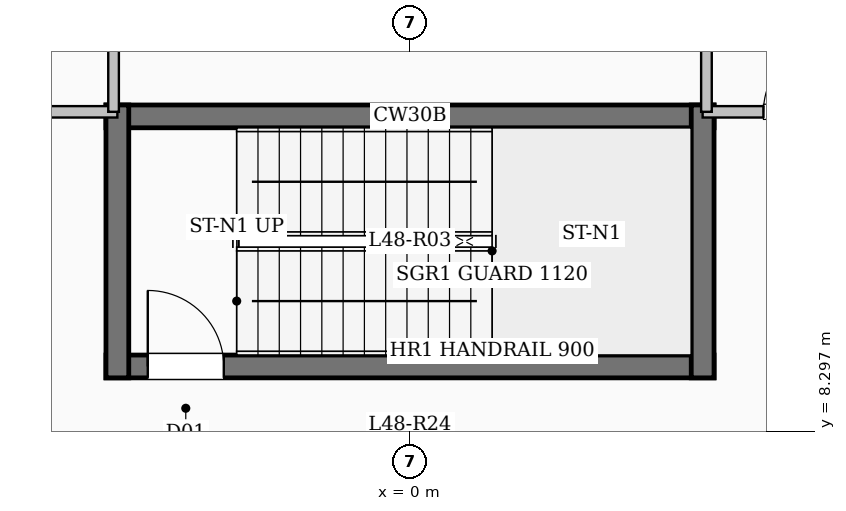
"""IFC4 building model, lengths in metres.
Left out: names, types, materials, properties, quantities, classifications, styles, units other than length and angle.
Written with IfcOpenShell. Run it as: python <this file> out.ifc"""

import sys

from ifc_helpers import new_model, si_unit, direction, frame, frame_2d, origin, place, context, subcontext, project, spatial, rectangle, extrude, element, fill, save


model = new_model("IFC4")
c1 = context("Model", 3, precision=1e-05, world=origin(), true_north=direction((0.0, 1.0)))
c2 = subcontext(c1, "Body", "Model", "MODEL_VIEW")
j1 = project(units=[si_unit("LENGTHUNIT", "METRE"), si_unit("PLANEANGLEUNIT", "RADIAN")], contexts=[c1])
p1 = place(None, origin())
s1 = spatial("IfcSite", under=j1, at=p1, CompositionType="ELEMENT")
p2 = place(p1, origin())
s2 = spatial("IfcBuilding", under=s1, at=p2, CompositionType="ELEMENT")
p3 = place(p2, frame((0.0, 0.0, 177.3)))
s3 = spatial("IfcBuildingStorey", under=s2, at=p3, CompositionType="ELEMENT", Elevation=177.3)
p4 = place(p3, frame((-4.0, 12.44, 0.0), z_axis=(0.0, 0.0, 1.0), x_axis=(1.0, 0.0, 0.0)))
e1 = element("IfcWall", 1, at=p4, inside=s3, PredefinedType="SHEAR", context=c2, shape_type="SweptSolid", body=[
    extrude(rectangle(XDim=8.0, YDim=0.3, at=frame_2d((4.0, 0.0))), origin(), (0.0, 0.0, 1.0), 4.5),
])
p5 = place(p3, frame((-4.0, 9.15, 0.0), z_axis=(0.0, 0.0, 1.0), x_axis=(1.0, 0.0, 0.0)))
e2 = element("IfcWall", 2, at=p5, inside=s3, PredefinedType="SHEAR", context=c2, shape_type="SweptSolid", body=[
    extrude(rectangle(XDim=8.0, YDim=0.3, at=frame_2d((4.0, 0.0))), origin(), (0.0, 0.0, 1.0), 4.5),
])
p6 = place(p5, frame((0.55, 0.0, 0.0)))
e3 = element("IfcOpeningElement", 3, at=p6, cuts=e2, PredefinedType="OPENING", context=c2, shape_type="SweptSolid", body=[
    extrude(rectangle(XDim=1.0, YDim=2.15, at=frame_2d((0.5, 1.075))), frame((0.0, 0.16, 0.0), z_axis=(0.0, -1.0, 0.0), x_axis=(1.0, 0.0, 0.0)), (0.0, 0.0, 1.0), 0.32),
])
for number, where, z_axis, x_axis in (
    (4, (-3.85, 9.0, 0.0), (0.0, 0.0, 1.0), (0.0, 1.0, 0.0)),
    (5, (3.85, 9.0, 0.0), (0.0, 0.0, 1.0), (0.0, 1.0, 0.0)),
):
    element("IfcWall", number, at=place(p3, frame(where, z_axis=z_axis, x_axis=x_axis)), inside=s3, PredefinedType="SHEAR", context=c2, shape_type="SweptSolid", body=[
        extrude(rectangle(XDim=3.59, YDim=0.3, at=frame_2d((1.795, 0.0))), origin(), (0.0, 0.0, 1.0), 4.5),
    ])
p7 = place(p3, frame((-19.55, 12.5, 0.0), z_axis=(0.0, 0.0, 1.0), x_axis=(1.0, 0.0, 0.0)))
e6 = element("IfcWall", 6, at=p7, inside=s3, PredefinedType="PARTITIONING", context=c2, shape_type="SweptSolid", body=[
    extrude(rectangle(XDim=15.7, YDim=0.15, at=frame_2d((7.85, 0.0))), origin(), (0.0, 0.0, 1.0), 4.2),
])
p8 = place(p7, frame((0.65, 0.0, 0.0)))
e7 = element("IfcOpeningElement", 7, at=p8, cuts=e6, PredefinedType="OPENING", context=c2, shape_type="SweptSolid", body=[
    extrude(rectangle(XDim=0.95, YDim=2.15, at=frame_2d((0.475, 1.075))), frame((0.0, 0.085, 0.0), z_axis=(0.0, -1.0, 0.0), x_axis=(1.0, 0.0, 0.0)), (0.0, 0.0, 1.0), 0.17),
])
p9 = place(p7, frame((4.55, 0.0, 0.0)))
e8 = element("IfcOpeningElement", 8, at=p9, cuts=e6, PredefinedType="OPENING", context=c2, shape_type="SweptSolid", body=[
    extrude(rectangle(XDim=0.95, YDim=2.15, at=frame_2d((0.475, 1.075))), frame((0.0, 0.085, 0.0), z_axis=(0.0, -1.0, 0.0), x_axis=(1.0, 0.0, 0.0)), (0.0, 0.0, 1.0), 0.17),
])
p10 = place(p7, frame((8.45, 0.0, 0.0)))
e9 = element("IfcOpeningElement", 9, at=p10, cuts=e6, PredefinedType="OPENING", context=c2, shape_type="SweptSolid", body=[
    extrude(rectangle(XDim=0.95, YDim=2.15, at=frame_2d((0.475, 1.075))), frame((0.0, 0.085, 0.0), z_axis=(0.0, -1.0, 0.0), x_axis=(1.0, 0.0, 0.0)), (0.0, 0.0, 1.0), 0.17),
])
p11 = place(p7, frame((12.35, 0.0, 0.0)))
e10 = element("IfcOpeningElement", 10, at=p11, cuts=e6, PredefinedType="OPENING", context=c2, shape_type="SweptSolid", body=[
    extrude(rectangle(XDim=0.95, YDim=2.15, at=frame_2d((0.475, 1.075))), frame((0.0, 0.085, 0.0), z_axis=(0.0, -1.0, 0.0), x_axis=(1.0, 0.0, 0.0)), (0.0, 0.0, 1.0), 0.17),
])
p12 = place(p3, frame((3.85, 12.5, 0.0), z_axis=(0.0, 0.0, 1.0), x_axis=(1.0, 0.0, 0.0)))
e11 = element("IfcWall", 11, at=p12, inside=s3, PredefinedType="PARTITIONING", context=c2, shape_type="SweptSolid", body=[
    extrude(rectangle(XDim=15.7, YDim=0.15, at=frame_2d((7.85, 0.0))), origin(), (0.0, 0.0, 1.0), 4.2),
])
p13 = place(p12, frame((0.8, 0.0, 0.0)))
e12 = element("IfcOpeningElement", 12, at=p13, cuts=e11, PredefinedType="OPENING", context=c2, shape_type="SweptSolid", body=[
    extrude(rectangle(XDim=0.95, YDim=2.15, at=frame_2d((0.475, 1.075))), frame((0.0, 0.085, 0.0), z_axis=(0.0, -1.0, 0.0), x_axis=(1.0, 0.0, 0.0)), (0.0, 0.0, 1.0), 0.17),
])
p14 = place(p12, frame((3.6, 0.0, 0.0)))
e13 = element("IfcOpeningElement", 13, at=p14, cuts=e11, PredefinedType="OPENING", context=c2, shape_type="SweptSolid", body=[
    extrude(rectangle(XDim=0.95, YDim=2.15, at=frame_2d((0.475, 1.075))), frame((0.0, 0.085, 0.0), z_axis=(0.0, -1.0, 0.0), x_axis=(1.0, 0.0, 0.0)), (0.0, 0.0, 1.0), 0.17),
])
p15 = place(p12, frame((6.55, 0.0, 0.0)))
e14 = element("IfcOpeningElement", 14, at=p15, cuts=e11, PredefinedType="OPENING", context=c2, shape_type="SweptSolid", body=[
    extrude(rectangle(XDim=1.08, YDim=2.15, at=frame_2d((0.54, 1.075))), frame((0.0, 0.085, 0.0), z_axis=(0.0, -1.0, 0.0), x_axis=(1.0, 0.0, 0.0)), (0.0, 0.0, 1.0), 0.17),
])
p16 = place(p12, frame((11.273, 0.0, 0.0)))
e15 = element("IfcOpeningElement", 15, at=p16, cuts=e11, PredefinedType="OPENING", context=c2, shape_type="SweptSolid", body=[
    extrude(rectangle(XDim=1.2, YDim=2.15, at=frame_2d((0.6, 1.075))), frame((0.0, 0.085, 0.0), z_axis=(0.0, -1.0, 0.0), x_axis=(1.0, 0.0, 0.0)), (0.0, 0.0, 1.0), 0.17),
])
for number, where, z_axis, x_axis in (
    (16, (-3.9, 12.5, 0.0), (0.0, 0.0, 1.0), (0.0, 1.0, 0.0)),
    (17, (3.9, 12.5, 0.0), (0.0, 0.0, 1.0), (0.0, 1.0, 0.0)),
):
    element("IfcWall", number, at=place(p3, frame(where, z_axis=z_axis, x_axis=x_axis)), inside=s3, PredefinedType="PARTITIONING", context=c2, shape_type="SweptSolid", body=[
        extrude(rectangle(XDim=10.18, YDim=0.14, at=frame_2d((5.09, 0.0))), origin(), (0.0, 0.0, 1.0), 4.2),
    ])
p17 = place(p6, origin())
e18 = element("IfcDoor", 18, at=p17, inside=s3, OperationType="SINGLE_SWING_LEFT", PredefinedType="DOOR", context=c2, shape_type="SweptSolid", body=[
    extrude(rectangle(XDim=1.0, YDim=2.15, at=frame_2d((0.5, 1.075))), frame((0.0, 0.025, 0.0), z_axis=(0.0, -1.0, 0.0), x_axis=(1.0, 0.0, 0.0)), (0.0, 0.0, 1.0), 0.05),
])
fill(e3, e18)
p18 = place(p13, origin())
e19 = element("IfcDoor", 19, at=p18, inside=s3, OperationType="SINGLE_SWING_RIGHT", PredefinedType="DOOR", context=c2, shape_type="SweptSolid", body=[
    extrude(rectangle(XDim=0.95, YDim=2.15, at=frame_2d((0.475, 1.075))), frame((0.0, 0.025, 0.0), z_axis=(0.0, -1.0, 0.0), x_axis=(1.0, 0.0, 0.0)), (0.0, 0.0, 1.0), 0.05),
])
fill(e12, e19)
save(model, sys.argv[1])
